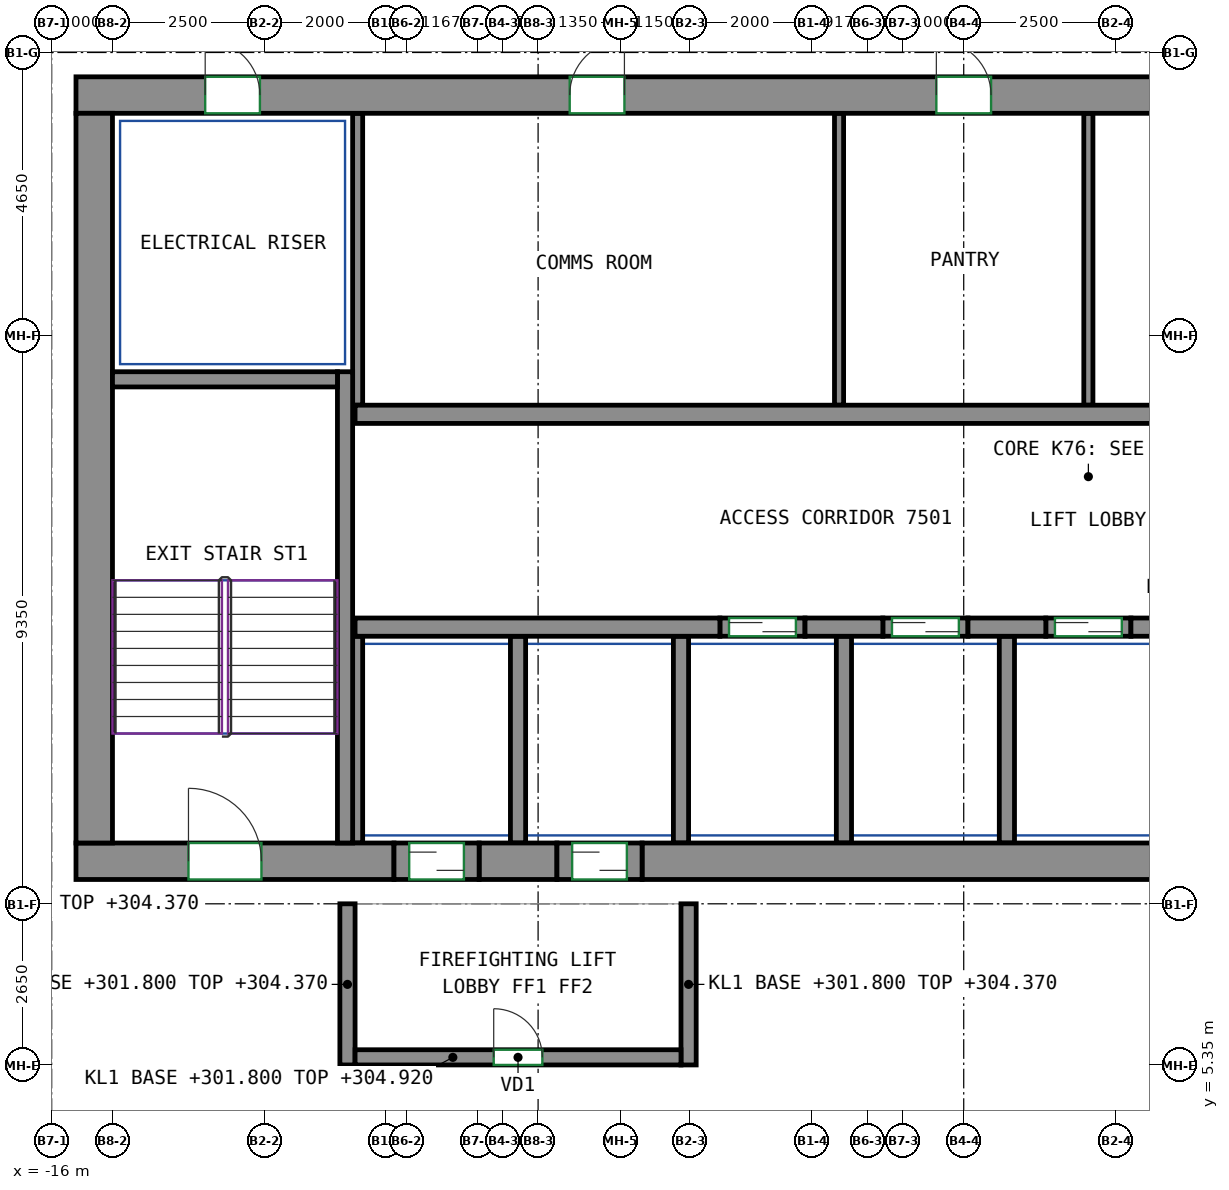
"""IFC4 building model, lengths in metres.
Left out: names, types, materials, properties, quantities, classifications, styles, units other than length and angle.
Written with IfcOpenShell. Run it as: python <this file> out.ifc"""

import sys

from ifc_helpers import new_model, si_unit, direction, frame, frame_2d, origin, place, context, subcontext, project, spatial, rectangle, extrude, source, transform, mapped, element, fill, save


model = new_model("IFC4")
c1 = context("Model", 3, precision=1e-05, world=origin(), true_north=direction((0.0, 1.0)))
c2 = subcontext(c1, "Body", "Model", "MODEL_VIEW")
j1 = project(units=[si_unit("LENGTHUNIT", "METRE"), si_unit("PLANEANGLEUNIT", "RADIAN")], contexts=[c1])
p1 = place(None, origin())
s1 = spatial("IfcSite", under=j1, at=p1, CompositionType="ELEMENT")
p2 = place(p1, origin())
s2 = spatial("IfcBuilding", under=s1, at=p2, CompositionType="ELEMENT")
p3 = place(p2, frame((0.0, 0.0, 301.8)))
s3 = spatial("IfcBuildingStorey", under=s2, at=p3, CompositionType="ELEMENT", Elevation=301.8)
m1 = source(origin(), c2, "Body", "SweptSolid", [
    extrude(rectangle(XDim=5.23, YDim=0.6, at=frame_2d((2.615, 0.0))), origin(), (0.0, 0.0, 1.0), 3.12),
])
p4 = place(p3, frame((-15.6, 8.7, 0.0), z_axis=(0.0, 0.0, 1.0), x_axis=(1.0, 0.0, 0.0)))
e1 = element("IfcWall", 1, at=p4, inside=s3, PredefinedType="SHEAR", context=c2, shape_type="MappedRepresentation", body=[
    mapped(m1, transform((0.0, 0.0, 0.0))),
])
p5 = place(p4, frame((1.85, 0.0, 0.0)))
e2 = element("IfcOpeningElement", 2, at=p5, cuts=e1, PredefinedType="OPENING", context=c2, shape_type="SweptSolid", body=[
    extrude(rectangle(XDim=1.2, YDim=2.1, at=frame_2d((0.6, 1.05))), frame((0.0, 0.31, 0.0), z_axis=(0.0, -1.0, 0.0), x_axis=(1.0, 0.0, 0.0)), (0.0, 0.0, 1.0), 0.62),
])
m2 = source(origin(), c2, "Body", "SweptSolid", [
    extrude(rectangle(XDim=1.28, YDim=0.6, at=frame_2d((0.64, 0.0))), origin(), (0.0, 0.0, 1.0), 3.12),
])
p6 = place(p3, frame((-8.97, 8.7, 0.0), z_axis=(0.0, 0.0, 1.0), x_axis=(1.0, 0.0, 0.0)))
e3 = element("IfcWall", 3, at=p6, inside=s3, PredefinedType="SHEAR", context=c2, shape_type="MappedRepresentation", body=[
    mapped(m2, transform((0.0, 0.0, 0.0))),
])
m3 = source(origin(), c2, "Body", "SweptSolid", [
    extrude(rectangle(XDim=14.18, YDim=0.6, at=frame_2d((7.09, 0.0))), origin(), (0.0, 0.0, 1.0), 3.12),
])
p7 = place(p3, frame((-6.29, 8.7, 0.0), z_axis=(0.0, 0.0, 1.0), x_axis=(1.0, 0.0, 0.0)))
e4 = element("IfcWall", 4, at=p7, inside=s3, PredefinedType="SHEAR", context=c2, shape_type="MappedRepresentation", body=[
    mapped(m3, transform((0.0, 0.0, 0.0))),
])
m4 = source(origin(), c2, "Body", "SweptSolid", [
    extrude(rectangle(XDim=33.3, YDim=0.6, at=frame_2d((16.65, 0.0))), origin(), (0.0, 0.0, 1.0), 3.12),
])
p8 = place(p3, frame((-15.6, 21.3, 0.0), z_axis=(0.0, 0.0, 1.0), x_axis=(1.0, 0.0, 0.0)))
e5 = element("IfcWall", 5, at=p8, inside=s3, PredefinedType="SHEAR", context=c2, shape_type="MappedRepresentation", body=[
    mapped(m4, transform((0.0, 0.0, 0.0))),
])
p9 = place(p8, frame((8.12, 0.0, 0.0)))
e6 = element("IfcOpeningElement", 6, at=p9, cuts=e5, PredefinedType="OPENING", context=c2, shape_type="SweptSolid", body=[
    extrude(rectangle(XDim=0.9, YDim=2.1, at=frame_2d((0.45, 1.05))), frame((0.0, 0.31, 0.0), z_axis=(0.0, -1.0, 0.0), x_axis=(1.0, 0.0, 0.0)), (0.0, 0.0, 1.0), 0.62),
])
p10 = place(p8, frame((14.15, 0.0, 0.0)))
e7 = element("IfcOpeningElement", 7, at=p10, cuts=e5, PredefinedType="OPENING", context=c2, shape_type="SweptSolid", body=[
    extrude(rectangle(XDim=0.9, YDim=2.1, at=frame_2d((0.45, 1.05))), frame((0.0, 0.31, 0.0), z_axis=(0.0, -1.0, 0.0), x_axis=(1.0, 0.0, 0.0)), (0.0, 0.0, 1.0), 0.62),
])
p11 = place(p8, frame((18.974, 0.0, 0.0)))
e8 = element("IfcOpeningElement", 8, at=p11, cuts=e5, PredefinedType="OPENING", context=c2, shape_type="SweptSolid", body=[
    extrude(rectangle(XDim=0.9, YDim=2.1, at=frame_2d((0.45, 1.05))), frame((0.0, 0.31, 0.0), z_axis=(0.0, -1.0, 0.0), x_axis=(1.0, 0.0, 0.0)), (0.0, 0.0, 1.0), 0.62),
])
p12 = place(p8, frame((23.664, 0.0, 0.0)))
e9 = element("IfcOpeningElement", 9, at=p12, cuts=e5, PredefinedType="OPENING", context=c2, shape_type="SweptSolid", body=[
    extrude(rectangle(XDim=0.9, YDim=2.1, at=frame_2d((0.45, 1.05))), frame((0.0, 0.31, 0.0), z_axis=(0.0, -1.0, 0.0), x_axis=(1.0, 0.0, 0.0)), (0.0, 0.0, 1.0), 0.62),
])
p13 = place(p8, frame((26.92, 0.0, 0.0)))
e10 = element("IfcOpeningElement", 10, at=p13, cuts=e5, PredefinedType="OPENING", context=c2, shape_type="SweptSolid", body=[
    extrude(rectangle(XDim=0.9, YDim=2.1, at=frame_2d((0.45, 1.05))), frame((0.0, 0.31, 0.0), z_axis=(0.0, -1.0, 0.0), x_axis=(1.0, 0.0, 0.0)), (0.0, 0.0, 1.0), 0.62),
])
p14 = place(p8, frame((2.125, 0.0, 0.0)))
e11 = element("IfcOpeningElement", 11, at=p14, cuts=e5, PredefinedType="OPENING", context=c2, shape_type="SweptSolid", body=[
    extrude(rectangle(XDim=0.9, YDim=2.1, at=frame_2d((0.45, 1.05))), frame((0.0, 0.31, 0.0), z_axis=(0.0, -1.0, 0.0), x_axis=(1.0, 0.0, 0.0)), (0.0, 0.0, 1.0), 0.62),
])
p15 = place(p8, frame((30.275, 0.0, 0.0)))
e12 = element("IfcOpeningElement", 12, at=p15, cuts=e5, PredefinedType="OPENING", context=c2, shape_type="SweptSolid", body=[
    extrude(rectangle(XDim=0.9, YDim=2.1, at=frame_2d((0.45, 1.05))), frame((0.0, 0.31, 0.0), z_axis=(0.0, -1.0, 0.0), x_axis=(1.0, 0.0, 0.0)), (0.0, 0.0, 1.0), 0.62),
])
m5 = source(origin(), c2, "Body", "SweptSolid", [
    extrude(rectangle(XDim=12.0, YDim=0.6, at=frame_2d((6.0, 0.0))), origin(), (0.0, 0.0, 1.0), 3.12),
])
p16 = place(p3, frame((-15.3, 9.0, 0.0), z_axis=(0.0, 0.0, 1.0), x_axis=(0.0, 1.0, 0.0)))
e13 = element("IfcWall", 13, at=p16, inside=s3, PredefinedType="SHEAR", context=c2, shape_type="MappedRepresentation", body=[
    mapped(m5, transform((0.0, 0.0, 0.0))),
])
m6 = source(origin(), c2, "Body", "SweptSolid", [
    extrude(rectangle(XDim=7.75, YDim=0.25, at=frame_2d((3.875, 0.0))), origin(), (0.0, 0.0, 1.0), 3.12),
])
p17 = place(p3, frame((-11.175, 9.0, 0.0), z_axis=(0.0, 0.0, 1.0), x_axis=(0.0, 1.0, 0.0)))
e14 = element("IfcWall", 14, at=p17, inside=s3, PredefinedType="SHEAR", context=c2, shape_type="MappedRepresentation", body=[
    mapped(m6, transform((0.0, 0.0, 0.0))),
])
m7 = source(origin(), c2, "Body", "SweptSolid", [
    extrude(rectangle(XDim=3.7, YDim=0.25, at=frame_2d((1.85, 0.0))), origin(), (0.0, 0.0, 1.0), 3.12),
])
p18 = place(p3, frame((-15.0, 16.625, 0.0), z_axis=(0.0, 0.0, 1.0), x_axis=(1.0, 0.0, 0.0)))
e15 = element("IfcWall", 15, at=p18, inside=s3, PredefinedType="SHEAR", context=c2, shape_type="MappedRepresentation", body=[
    mapped(m7, transform((0.0, 0.0, 0.0))),
])
m8 = source(origin(), c2, "Body", "SweptSolid", [
    extrude(rectangle(XDim=6.0, YDim=0.3, at=frame_2d((3.0, 0.0))), origin(), (0.0, 0.0, 1.0), 3.12),
])
p19 = place(p3, frame((-11.01, 12.55, 0.0), z_axis=(0.0, 0.0, 1.0), x_axis=(1.0, 0.0, 0.0)))
e16 = element("IfcWall", 16, at=p19, inside=s3, PredefinedType="SHEAR", context=c2, shape_type="MappedRepresentation", body=[
    mapped(m8, transform((0.0, 0.0, 0.0))),
])
m9 = source(origin(), c2, "Body", "SweptSolid", [
    extrude(rectangle(XDim=1.28, YDim=0.3, at=frame_2d((0.64, 0.0))), origin(), (0.0, 0.0, 1.0), 3.12),
])
for number, where, z_axis, x_axis in (
    (17, (-3.61, 12.55, 0.0), (0.0, 0.0, 1.0), (1.0, 0.0, 0.0)),
    (18, (-0.93, 12.55, 0.0), (0.0, 0.0, 1.0), (1.0, 0.0, 0.0)),
    (19, (1.75, 12.55, 0.0), (0.0, 0.0, 1.0), (1.0, 0.0, 0.0)),
):
    element("IfcWall", number, at=place(p3, frame(where, z_axis=z_axis, x_axis=x_axis)), inside=s3, PredefinedType="SHEAR", context=c2, shape_type="MappedRepresentation", body=[
        mapped(m9, transform((0.0, 0.0, 0.0))),
    ])
m10 = source(origin(), c2, "Body", "SweptSolid", [
    extrude(rectangle(XDim=22.08, YDim=0.3, at=frame_2d((11.04, 0.0))), origin(), (0.0, 0.0, 1.0), 3.12),
])
p20 = place(p3, frame((-11.01, 16.05, 0.0), z_axis=(0.0, 0.0, 1.0), x_axis=(1.0, 0.0, 0.0)))
e20 = element("IfcWall", 20, at=p20, inside=s3, PredefinedType="SHEAR", context=c2, shape_type="MappedRepresentation", body=[
    mapped(m10, transform((0.0, 0.0, 0.0))),
])
m11 = source(origin(), c2, "Body", "SweptSolid", [
    extrude(rectangle(XDim=1.4, YDim=0.3, at=frame_2d((0.7, 0.0))), origin(), (0.0, 0.0, 1.0), 3.12),
])
p21 = place(p3, frame((-5.01, 12.55, 0.0), z_axis=(0.0, 0.0, 1.0), x_axis=(1.0, 0.0, 0.0)))
e21 = element("IfcWall", 21, at=p21, inside=s3, PredefinedType="PARTITIONING", context=c2, shape_type="MappedRepresentation", body=[
    mapped(m11, transform((0.0, 0.0, 0.0))),
])
p22 = place(p21, frame((0.15, 0.0, 0.0)))
e22 = element("IfcOpeningElement", 22, at=p22, cuts=e21, PredefinedType="OPENING", context=c2, shape_type="SweptSolid", body=[
    extrude(rectangle(XDim=1.1, YDim=2.1, at=frame_2d((0.55, 1.05))), frame((0.0, 0.16, 0.0), z_axis=(0.0, -1.0, 0.0), x_axis=(1.0, 0.0, 0.0)), (0.0, 0.0, 1.0), 0.32),
])
m12 = source(origin(), c2, "Body", "SweptSolid", [
    extrude(rectangle(XDim=1.4, YDim=0.3, at=frame_2d((0.7, 0.0))), origin(), (0.0, 0.0, 1.0), 3.12),
])
p23 = place(p3, frame((-2.33, 12.55, 0.0), z_axis=(0.0, 0.0, 1.0), x_axis=(1.0, 0.0, 0.0)))
e23 = element("IfcWall", 23, at=p23, inside=s3, PredefinedType="PARTITIONING", context=c2, shape_type="MappedRepresentation", body=[
    mapped(m12, transform((0.0, 0.0, 0.0))),
])
p24 = place(p23, frame((0.15, 0.0, 0.0)))
e24 = element("IfcOpeningElement", 24, at=p24, cuts=e23, PredefinedType="OPENING", context=c2, shape_type="SweptSolid", body=[
    extrude(rectangle(XDim=1.1, YDim=2.1, at=frame_2d((0.55, 1.05))), frame((0.0, 0.16, 0.0), z_axis=(0.0, -1.0, 0.0), x_axis=(1.0, 0.0, 0.0)), (0.0, 0.0, 1.0), 0.32),
])
p25 = place(p3, frame((0.35, 12.55, 0.0), z_axis=(0.0, 0.0, 1.0), x_axis=(1.0, 0.0, 0.0)))
e25 = element("IfcWall", 25, at=p25, inside=s3, PredefinedType="PARTITIONING", context=c2, shape_type="MappedRepresentation", body=[
    mapped(m11, transform((0.0, 0.0, 0.0))),
])
p26 = place(p25, frame((0.15, 0.0, 0.0)))
e26 = element("IfcOpeningElement", 26, at=p26, cuts=e25, PredefinedType="OPENING", context=c2, shape_type="SweptSolid", body=[
    extrude(rectangle(XDim=1.1, YDim=2.1, at=frame_2d((0.55, 1.05))), frame((0.0, 0.16, 0.0), z_axis=(0.0, -1.0, 0.0), x_axis=(1.0, 0.0, 0.0)), (0.0, 0.0, 1.0), 0.32),
])
m13 = source(origin(), c2, "Body", "SweptSolid", [
    extrude(rectangle(XDim=2.65, YDim=0.25, at=frame_2d((1.325, 0.0))), origin(), (0.0, 0.0, 1.0), 2.57),
])
for number, where, z_axis, x_axis in (
    (27, (-11.135, 5.35, 0.0), (0.0, 0.0, 1.0), (0.0, 1.0, 0.0)),
    (28, (-5.525, 5.35, 0.0), (0.0, 0.0, 1.0), (0.0, 1.0, 0.0)),
):
    element("IfcWall", number, at=place(p3, frame(where, z_axis=z_axis, x_axis=x_axis)), inside=s3, PredefinedType="PARTITIONING", context=c2, shape_type="MappedRepresentation", body=[
        mapped(m13, transform((0.0, 0.0, 0.0))),
    ])
m14 = source(origin(), c2, "Body", "SweptSolid", [
    extrude(rectangle(XDim=5.36, YDim=0.25, at=frame_2d((2.68, 0.0))), origin(), (0.0, 0.0, 1.0), 3.12),
])
p27 = place(p3, frame((-11.01, 5.475, 0.0), z_axis=(0.0, 0.0, 1.0), x_axis=(1.0, 0.0, 0.0)))
e29 = element("IfcWall", 29, at=p27, inside=s3, PredefinedType="PARTITIONING", context=c2, shape_type="MappedRepresentation", body=[
    mapped(m14, transform((0.0, 0.0, 0.0))),
])
p28 = place(p27, frame((2.28, 0.0, 0.0)))
e30 = element("IfcOpeningElement", 30, at=p28, cuts=e29, PredefinedType="OPENING", context=c2, shape_type="SweptSolid", body=[
    extrude(rectangle(XDim=0.8, YDim=2.0, at=frame_2d((0.4, 1.0))), frame((0.0, 0.135, 0.0), z_axis=(0.0, -1.0, 0.0), x_axis=(1.0, 0.0, 0.0)), (0.0, 0.0, 1.0), 0.27),
])
m15 = source(origin(), c2, "Body", "SweptSolid", [
    extrude(rectangle(XDim=4.8, YDim=0.165, at=frame_2d((2.4, 0.0))), origin(), (0.0, 0.0, 1.0), 3.12),
])
p29 = place(p3, frame((-10.968, 16.2, 0.0), z_axis=(0.0, 0.0, 1.0), x_axis=(0.0, 1.0, 0.0)))
e31 = element("IfcWall", 31, at=p29, inside=s3, PredefinedType="PARTITIONING", context=c2, shape_type="MappedRepresentation", body=[
    mapped(m15, transform((0.0, 0.0, 0.0))),
])
m16 = source(origin(), c2, "Body", "SweptSolid", [
    extrude(rectangle(XDim=3.4, YDim=0.25, at=frame_2d((1.7, 0.0))), origin(), (0.0, 0.0, 1.0), 3.12),
])
p30 = place(p3, frame((-0.29, 9.0, 0.0), z_axis=(0.0, 0.0, 1.0), x_axis=(0.0, 1.0, 0.0)))
e32 = element("IfcWall", 32, at=p30, inside=s3, PredefinedType="PARTITIONING", context=c2, shape_type="MappedRepresentation", body=[
    mapped(m16, transform((0.0, 0.0, 0.0))),
])
m17 = source(origin(), c2, "Body", "SweptSolid", [
    extrude(rectangle(XDim=3.4, YDim=0.165, at=frame_2d((1.7, 0.0))), origin(), (0.0, 0.0, 1.0), 3.12),
])
p31 = place(p3, frame((-10.968, 9.0, 0.0), z_axis=(0.0, 0.0, 1.0), x_axis=(0.0, 1.0, 0.0)))
e33 = element("IfcWall", 33, at=p31, inside=s3, PredefinedType="PARTITIONING", context=c2, shape_type="MappedRepresentation", body=[
    mapped(m17, transform((0.0, 0.0, 0.0))),
])
for number, where, z_axis, x_axis in (
    (34, (-2.97, 9.0, 0.0), (0.0, 0.0, 1.0), (0.0, 1.0, 0.0)),
    (35, (-5.65, 9.0, 0.0), (0.0, 0.0, 1.0), (0.0, 1.0, 0.0)),
    (36, (-8.33, 9.0, 0.0), (0.0, 0.0, 1.0), (0.0, 1.0, 0.0)),
):
    element("IfcWall", number, at=place(p3, frame(where, z_axis=z_axis, x_axis=x_axis)), inside=s3, PredefinedType="PARTITIONING", context=c2, shape_type="MappedRepresentation", body=[
        mapped(m16, transform((0.0, 0.0, 0.0))),
    ])
m18 = source(origin(), c2, "Body", "SweptSolid", [
    extrude(rectangle(XDim=4.8, YDim=0.15, at=frame_2d((2.4, 0.0))), origin(), (0.0, 0.0, 1.0), 3.12),
])
for number, where, z_axis, x_axis in (
    (37, (-3.05, 16.2, 0.0), (0.0, 0.0, 1.0), (0.0, 1.0, 0.0)),
    (38, (1.05, 16.2, 0.0), (0.0, 0.0, 1.0), (0.0, 1.0, 0.0)),
):
    element("IfcWall", number, at=place(p3, frame(where, z_axis=z_axis, x_axis=x_axis)), inside=s3, PredefinedType="PARTITIONING", context=c2, shape_type="MappedRepresentation", body=[
        mapped(m18, transform((0.0, 0.0, 0.0))),
    ])
m19 = source(origin(), c2, "Body", "SweptSolid", [
    extrude(rectangle(XDim=1.4, YDim=0.6, at=frame_2d((0.7, 0.0))), origin(), (0.0, 0.0, 1.0), 2.7),
])
p32 = place(p3, frame((-10.37, 8.7, 0.0), z_axis=(0.0, 0.0, 1.0), x_axis=(1.0, 0.0, 0.0)))
e39 = element("IfcWall", 39, at=p32, inside=s3, PredefinedType="PARTITIONING", context=c2, shape_type="MappedRepresentation", body=[
    mapped(m19, transform((0.0, 0.0, 0.0))),
])
p33 = place(p32, frame((0.25, 0.0, 0.0)))
e40 = element("IfcOpeningElement", 40, at=p33, cuts=e39, PredefinedType="OPENING", context=c2, shape_type="SweptSolid", body=[
    extrude(rectangle(XDim=0.9, YDim=2.1, at=frame_2d((0.45, 1.05))), frame((0.0, 0.31, 0.0), z_axis=(0.0, -1.0, 0.0), x_axis=(1.0, 0.0, 0.0)), (0.0, 0.0, 1.0), 0.62),
])
m20 = source(origin(), c2, "Body", "SweptSolid", [
    extrude(rectangle(XDim=1.4, YDim=0.6, at=frame_2d((0.7, 0.0))), origin(), (0.0, 0.0, 1.0), 2.7),
])
p34 = place(p3, frame((-7.69, 8.7, 0.0), z_axis=(0.0, 0.0, 1.0), x_axis=(1.0, 0.0, 0.0)))
e41 = element("IfcWall", 41, at=p34, inside=s3, PredefinedType="PARTITIONING", context=c2, shape_type="MappedRepresentation", body=[
    mapped(m20, transform((0.0, 0.0, 0.0))),
])
p35 = place(p34, frame((0.25, 0.0, 0.0)))
e42 = element("IfcOpeningElement", 42, at=p35, cuts=e41, PredefinedType="OPENING", context=c2, shape_type="SweptSolid", body=[
    extrude(rectangle(XDim=0.9, YDim=2.1, at=frame_2d((0.45, 1.05))), frame((0.0, 0.31, 0.0), z_axis=(0.0, -1.0, 0.0), x_axis=(1.0, 0.0, 0.0)), (0.0, 0.0, 1.0), 0.62),
])
p36 = place(p28, origin())
e43 = element("IfcDoor", 43, at=p36, inside=s3, OperationType="SINGLE_SWING_LEFT", PredefinedType="DOOR", context=c2, shape_type="SweptSolid", body=[
    extrude(rectangle(XDim=0.8, YDim=2.0, at=frame_2d((0.4, 1.0))), frame((0.0, 0.025, 0.0), z_axis=(0.0, -1.0, 0.0), x_axis=(1.0, 0.0, 0.0)), (0.0, 0.0, 1.0), 0.05),
])
fill(e30, e43)
p37 = place(p33, origin())
e44 = element("IfcDoor", 44, at=p37, inside=s3, OperationType="SLIDING_TO_LEFT", PredefinedType="DOOR", context=c2, shape_type="SweptSolid", body=[
    extrude(rectangle(XDim=0.9, YDim=2.1, at=frame_2d((0.45, 1.05))), frame((0.0, 0.205, 0.0), z_axis=(0.0, -1.0, 0.0), x_axis=(1.0, 0.0, 0.0)), (0.0, 0.0, 1.0), 0.05),
])
fill(e40, e44)
p38 = place(p35, origin())
e45 = element("IfcDoor", 45, at=p38, inside=s3, OperationType="SLIDING_TO_RIGHT", PredefinedType="DOOR", context=c2, shape_type="SweptSolid", body=[
    extrude(rectangle(XDim=0.9, YDim=2.1, at=frame_2d((0.45, 1.05))), frame((0.0, 0.205, 0.0), z_axis=(0.0, -1.0, 0.0), x_axis=(1.0, 0.0, 0.0)), (0.0, 0.0, 1.0), 0.05),
])
fill(e42, e45)
p39 = place(p22, origin())
e46 = element("IfcDoor", 46, at=p39, inside=s3, OperationType="DOUBLE_DOOR_SLIDING", PredefinedType="DOOR", context=c2, shape_type="SweptSolid", body=[
    extrude(rectangle(XDim=1.1, YDim=2.1, at=frame_2d((0.55, 1.05))), frame((0.0, 0.025, 0.0), z_axis=(0.0, -1.0, 0.0), x_axis=(1.0, 0.0, 0.0)), (0.0, 0.0, 1.0), 0.05),
])
fill(e22, e46)
p40 = place(p24, origin())
e47 = element("IfcDoor", 47, at=p40, inside=s3, OperationType="DOUBLE_DOOR_SLIDING", PredefinedType="DOOR", context=c2, shape_type="SweptSolid", body=[
    extrude(rectangle(XDim=1.1, YDim=2.1, at=frame_2d((0.55, 1.05))), frame((0.0, 0.025, 0.0), z_axis=(0.0, -1.0, 0.0), x_axis=(1.0, 0.0, 0.0)), (0.0, 0.0, 1.0), 0.05),
])
fill(e24, e47)
p41 = place(p26, origin())
e48 = element("IfcDoor", 48, at=p41, inside=s3, OperationType="DOUBLE_DOOR_SLIDING", PredefinedType="DOOR", context=c2, shape_type="SweptSolid", body=[
    extrude(rectangle(XDim=1.1, YDim=2.1, at=frame_2d((0.55, 1.05))), frame((0.0, 0.025, 0.0), z_axis=(0.0, -1.0, 0.0), x_axis=(1.0, 0.0, 0.0)), (0.0, 0.0, 1.0), 0.05),
])
fill(e26, e48)
p42 = place(p9, origin())
e49 = element("IfcDoor", 49, at=p42, inside=s3, OperationType="SINGLE_SWING_RIGHT", PredefinedType="DOOR", context=c2, shape_type="SweptSolid", body=[
    extrude(rectangle(XDim=0.9, YDim=2.1, at=frame_2d((0.45, 1.05))), frame((0.0, -0.155, 0.0), z_axis=(0.0, -1.0, 0.0), x_axis=(1.0, 0.0, 0.0)), (0.0, 0.0, 1.0), 0.05),
])
fill(e6, e49)
p43 = place(p10, origin())
e50 = element("IfcDoor", 50, at=p43, inside=s3, OperationType="SINGLE_SWING_LEFT", PredefinedType="DOOR", context=c2, shape_type="SweptSolid", body=[
    extrude(rectangle(XDim=0.9, YDim=2.1, at=frame_2d((0.45, 1.05))), frame((0.0, -0.155, 0.0), z_axis=(0.0, -1.0, 0.0), x_axis=(1.0, 0.0, 0.0)), (0.0, 0.0, 1.0), 0.05),
])
fill(e7, e50)
p44 = place(p14, origin())
e51 = element("IfcDoor", 51, at=p44, inside=s3, OperationType="SINGLE_SWING_LEFT", PredefinedType="DOOR", context=c2, shape_type="SweptSolid", body=[
    extrude(rectangle(XDim=0.9, YDim=2.1, at=frame_2d((0.45, 1.05))), frame((0.0, -0.155, 0.0), z_axis=(0.0, -1.0, 0.0), x_axis=(1.0, 0.0, 0.0)), (0.0, 0.0, 1.0), 0.05),
])
fill(e11, e51)
p45 = place(p5, origin())
e52 = element("IfcDoor", 52, at=p45, inside=s3, OperationType="DOUBLE_DOOR_SINGLE_SWING", PredefinedType="DOOR", context=c2, shape_type="SweptSolid", body=[
    extrude(rectangle(XDim=1.2, YDim=2.1, at=frame_2d((0.6, 1.05))), frame((0.0, 0.205, 0.0), z_axis=(0.0, -1.0, 0.0), x_axis=(1.0, 0.0, 0.0)), (0.0, 0.0, 1.0), 0.05),
])
fill(e2, e52)
save(model, sys.argv[1])
